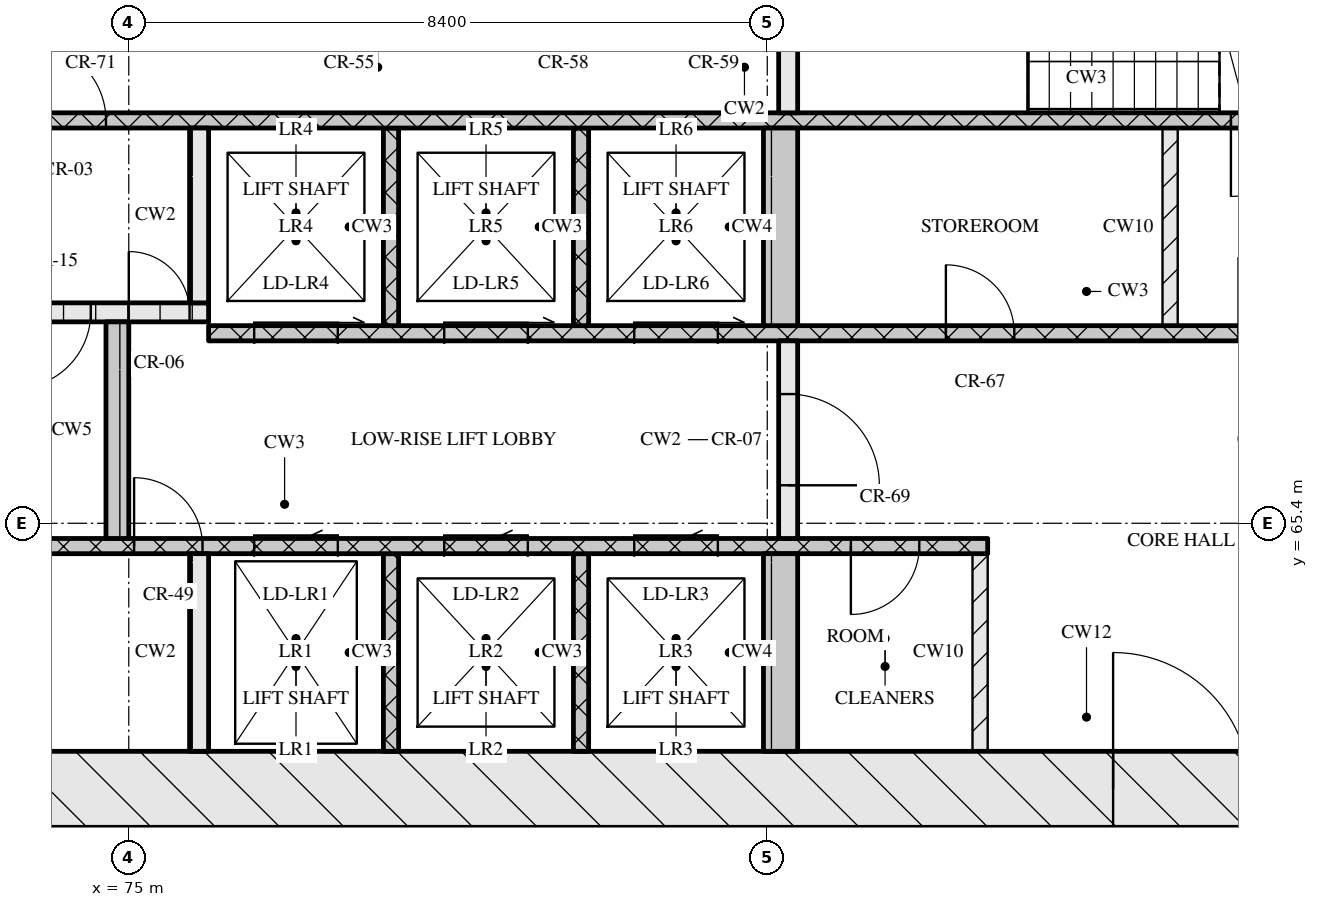
"""IFC4 building model, lengths in metres.
Left out: names, types, materials, properties, quantities, classifications, styles, units other than length and angle.
Written with IfcOpenShell. Run it as: python <this file> out.ifc"""

import sys

from ifc_helpers import new_model, si_unit, direction, frame, frame_2d, origin, place, context, subcontext, project, spatial, rectangle, extrude, element, fill, save


model = new_model("IFC4")
c1 = context("Model", 3, precision=1e-05, world=origin(), true_north=direction((0.0, 1.0)))
c2 = subcontext(c1, "Body", "Model", "MODEL_VIEW")
j1 = project(units=[si_unit("LENGTHUNIT", "METRE"), si_unit("PLANEANGLEUNIT", "RADIAN")], contexts=[c1])
p1 = place(None, origin())
s1 = spatial("IfcSite", under=j1, at=p1, CompositionType="ELEMENT")
p2 = place(p1, origin())
s2 = spatial("IfcBuilding", under=s1, at=p2, CompositionType="ELEMENT")
p3 = place(p2, frame((0.0, 0.0, 113.25)))
s3 = spatial("IfcBuildingStorey", under=s2, at=p3, CompositionType="ELEMENT", Elevation=113.25)
p4 = place(p3, frame((66.8, 61.9, 0.0), z_axis=(0.0, 0.0, 1.0), x_axis=(1.0, 0.0, 0.0)))
e1 = element("IfcWall", 1, at=p4, inside=s3, PredefinedType="SOLIDWALL", context=c2, shape_type="SweptSolid", body=[
    extrude(rectangle(XDim=41.6, YDim=1.0, at=frame_2d((20.8, 0.0))), origin(), (0.0, 0.0, 1.0), 3.32),
])
p5 = place(p4, frame((21.15, 0.0, 0.0)))
e2 = element("IfcOpeningElement", 2, at=p5, cuts=e1, PredefinedType="OPENING", context=c2, shape_type="SweptSolid", body=[
    extrude(rectangle(XDim=1.8, YDim=2.1, at=frame_2d((0.9, 1.05))), frame((0.0, 0.51, 0.0), z_axis=(0.0, -1.0, 0.0), x_axis=(1.0, 0.0, 0.0)), (0.0, 0.0, 1.0), 1.02),
])
p6 = place(p3, frame((75.925, 62.4, 0.0), z_axis=(0.0, 0.0, 1.0), x_axis=(0.0, 1.0, 0.0)))
e3 = element("IfcWall", 3, at=p6, inside=s3, PredefinedType="SOLIDWALL", context=c2, shape_type="SweptSolid", body=[
    extrude(rectangle(XDim=2.6, YDim=0.25, at=frame_2d((1.3, 0.0))), origin(), (0.0, 0.0, 1.0), 3.32),
])
for number, where, z_axis, x_axis in (
    (4, (78.45, 62.4, 0.0), (0.0, 0.0, 1.0), (0.0, 1.0, 0.0)),
    (5, (80.95, 62.4, 0.0), (0.0, 0.0, 1.0), (0.0, 1.0, 0.0)),
):
    element("IfcWall", number, at=place(p3, frame(where, z_axis=z_axis, x_axis=x_axis)), inside=s3, PredefinedType="SOLIDWALL", context=c2, shape_type="SweptSolid", body=[
        extrude(rectangle(XDim=2.6, YDim=0.2, at=frame_2d((1.3, 0.0))), origin(), (0.0, 0.0, 1.0), 3.32),
    ])
p7 = place(p3, frame((83.575, 62.4, 0.0), z_axis=(0.0, 0.0, 1.0), x_axis=(0.0, 1.0, 0.0)))
e6 = element("IfcWall", 6, at=p7, inside=s3, PredefinedType="SOLIDWALL", context=c2, shape_type="SweptSolid", body=[
    extrude(rectangle(XDim=2.6, YDim=0.45, at=frame_2d((1.3, 0.0))), origin(), (0.0, 0.0, 1.0), 3.32),
])
p8 = place(p3, frame((86.2, 62.4, 0.0), z_axis=(0.0, 0.0, 1.0), x_axis=(0.0, 1.0, 0.0)))
e7 = element("IfcWall", 7, at=p8, inside=s3, PredefinedType="PARTITIONING", context=c2, shape_type="SweptSolid", body=[
    extrude(rectangle(XDim=2.6, YDim=0.2, at=frame_2d((1.3, 0.0))), origin(), (0.0, 0.0, 1.0), 3.32),
])
p9 = place(p3, frame((67.8, 65.1, 0.0), z_axis=(0.0, 0.0, 1.0), x_axis=(1.0, 0.0, 0.0)))
e8 = element("IfcWall", 8, at=p9, inside=s3, PredefinedType="SOLIDWALL", context=c2, shape_type="SweptSolid", body=[
    extrude(rectangle(XDim=18.5, YDim=0.2, at=frame_2d((9.25, 0.0))), origin(), (0.0, 0.0, 1.0), 3.32),
])
p10 = place(p9, frame((7.27, 0.0, 0.0)))
e9 = element("IfcOpeningElement", 9, at=p10, cuts=e8, PredefinedType="OPENING", context=c2, shape_type="SweptSolid", body=[
    extrude(rectangle(XDim=0.9, YDim=2.1, at=frame_2d((0.45, 1.05))), frame((0.0, 0.11, 0.0), z_axis=(0.0, -1.0, 0.0), x_axis=(1.0, 0.0, 0.0)), (0.0, 0.0, 1.0), 0.22),
])
p11 = place(p9, frame((8.85, 0.0, 0.0)))
e10 = element("IfcOpeningElement", 10, at=p11, cuts=e8, PredefinedType="OPENING", context=c2, shape_type="SweptSolid", body=[
    extrude(rectangle(XDim=1.1, YDim=2.1, at=frame_2d((0.55, 1.05))), frame((0.0, 0.11, 0.0), z_axis=(0.0, -1.0, 0.0), x_axis=(1.0, 0.0, 0.0)), (0.0, 0.0, 1.0), 0.22),
])
p12 = place(p9, frame((11.35, 0.0, 0.0)))
e11 = element("IfcOpeningElement", 11, at=p12, cuts=e8, PredefinedType="OPENING", context=c2, shape_type="SweptSolid", body=[
    extrude(rectangle(XDim=1.1, YDim=2.1, at=frame_2d((0.55, 1.05))), frame((0.0, 0.11, 0.0), z_axis=(0.0, -1.0, 0.0), x_axis=(1.0, 0.0, 0.0)), (0.0, 0.0, 1.0), 0.22),
])
p13 = place(p9, frame((13.85, 0.0, 0.0)))
e12 = element("IfcOpeningElement", 12, at=p13, cuts=e8, PredefinedType="OPENING", context=c2, shape_type="SweptSolid", body=[
    extrude(rectangle(XDim=1.1, YDim=2.1, at=frame_2d((0.55, 1.05))), frame((0.0, 0.11, 0.0), z_axis=(0.0, -1.0, 0.0), x_axis=(1.0, 0.0, 0.0)), (0.0, 0.0, 1.0), 0.22),
])
p14 = place(p9, frame((16.7, 0.0, 0.0)))
e13 = element("IfcOpeningElement", 13, at=p14, cuts=e8, PredefinedType="OPENING", context=c2, shape_type="SweptSolid", body=[
    extrude(rectangle(XDim=0.9, YDim=2.1, at=frame_2d((0.45, 1.05))), frame((0.0, 0.11, 0.0), z_axis=(0.0, -1.0, 0.0), x_axis=(1.0, 0.0, 0.0)), (0.0, 0.0, 1.0), 0.22),
])
p15 = place(p3, frame((74.85, 65.2, 0.0), z_axis=(0.0, 0.0, 1.0), x_axis=(0.0, 1.0, 0.0)))
e14 = element("IfcWall", 14, at=p15, inside=s3, PredefinedType="SOLIDWALL", context=c2, shape_type="SweptSolid", body=[
    extrude(rectangle(XDim=2.85, YDim=0.3, at=frame_2d((1.425, 0.0))), origin(), (0.0, 0.0, 1.0), 3.32),
])
p16 = place(p3, frame((83.675, 65.2, 0.0), z_axis=(0.0, 0.0, 1.0), x_axis=(0.0, 1.0, 0.0)))
e15 = element("IfcWall", 15, at=p16, inside=s3, PredefinedType="SOLIDWALL", context=c2, shape_type="SweptSolid", body=[
    extrude(rectangle(XDim=2.6, YDim=0.25, at=frame_2d((1.3, 0.0))), origin(), (0.0, 0.0, 1.0), 3.32),
])
p17 = place(p16, frame((0.7, 0.0, 0.0)))
e16 = element("IfcOpeningElement", 16, at=p17, cuts=e15, PredefinedType="OPENING", context=c2, shape_type="SweptSolid", body=[
    extrude(rectangle(XDim=1.2, YDim=2.1, at=frame_2d((0.6, 1.05))), frame((0.0, 0.135, 0.0), z_axis=(0.0, -1.0, 0.0), x_axis=(1.0, 0.0, 0.0)), (0.0, 0.0, 1.0), 0.27),
])
p18 = place(p3, frame((76.05, 67.9, 0.0), z_axis=(0.0, 0.0, 1.0), x_axis=(1.0, 0.0, 0.0)))
e17 = element("IfcWall", 17, at=p18, inside=s3, PredefinedType="SOLIDWALL", context=c2, shape_type="SweptSolid", body=[
    extrude(rectangle(XDim=23.1, YDim=0.2, at=frame_2d((11.55, 0.0))), origin(), (0.0, 0.0, 1.0), 3.32),
])
p19 = place(p18, frame((0.6, 0.0, 0.0)))
e18 = element("IfcOpeningElement", 18, at=p19, cuts=e17, PredefinedType="OPENING", context=c2, shape_type="SweptSolid", body=[
    extrude(rectangle(XDim=1.1, YDim=2.1, at=frame_2d((0.55, 1.05))), frame((0.0, 0.11, 0.0), z_axis=(0.0, -1.0, 0.0), x_axis=(1.0, 0.0, 0.0)), (0.0, 0.0, 1.0), 0.22),
])
p20 = place(p18, frame((3.1, 0.0, 0.0)))
e19 = element("IfcOpeningElement", 19, at=p20, cuts=e17, PredefinedType="OPENING", context=c2, shape_type="SweptSolid", body=[
    extrude(rectangle(XDim=1.1, YDim=2.1, at=frame_2d((0.55, 1.05))), frame((0.0, 0.11, 0.0), z_axis=(0.0, -1.0, 0.0), x_axis=(1.0, 0.0, 0.0)), (0.0, 0.0, 1.0), 0.22),
])
p21 = place(p18, frame((5.6, 0.0, 0.0)))
e20 = element("IfcOpeningElement", 20, at=p21, cuts=e17, PredefinedType="OPENING", context=c2, shape_type="SweptSolid", body=[
    extrude(rectangle(XDim=1.1, YDim=2.1, at=frame_2d((0.55, 1.05))), frame((0.0, 0.11, 0.0), z_axis=(0.0, -1.0, 0.0), x_axis=(1.0, 0.0, 0.0)), (0.0, 0.0, 1.0), 0.22),
])
p22 = place(p18, frame((9.7, 0.0, 0.0)))
e21 = element("IfcOpeningElement", 21, at=p22, cuts=e17, PredefinedType="OPENING", context=c2, shape_type="SweptSolid", body=[
    extrude(rectangle(XDim=0.9, YDim=2.1, at=frame_2d((0.45, 1.05))), frame((0.0, 0.11, 0.0), z_axis=(0.0, -1.0, 0.0), x_axis=(1.0, 0.0, 0.0)), (0.0, 0.0, 1.0), 0.22),
])
p23 = place(p18, frame((13.55, 0.0, 0.0)))
e22 = element("IfcOpeningElement", 22, at=p23, cuts=e17, PredefinedType="OPENING", context=c2, shape_type="SweptSolid", body=[
    extrude(rectangle(XDim=1.0, YDim=2.1, at=frame_2d((0.5, 1.05))), frame((0.0, 0.11, 0.0), z_axis=(0.0, -1.0, 0.0), x_axis=(1.0, 0.0, 0.0)), (0.0, 0.0, 1.0), 0.22),
])
for number, where, z_axis, x_axis in (
    (23, (78.45, 68.0, 0.0), (0.0, 0.0, 1.0), (0.0, 1.0, 0.0)),
    (24, (80.95, 68.0, 0.0), (0.0, 0.0, 1.0), (0.0, 1.0, 0.0)),
):
    element("IfcWall", number, at=place(p3, frame(where, z_axis=z_axis, x_axis=x_axis)), inside=s3, PredefinedType="SOLIDWALL", context=c2, shape_type="SweptSolid", body=[
        extrude(rectangle(XDim=2.6, YDim=0.2, at=frame_2d((1.3, 0.0))), origin(), (0.0, 0.0, 1.0), 3.32),
    ])
p24 = place(p3, frame((83.575, 68.0, 0.0), z_axis=(0.0, 0.0, 1.0), x_axis=(0.0, 1.0, 0.0)))
e25 = element("IfcWall", 25, at=p24, inside=s3, PredefinedType="SOLIDWALL", context=c2, shape_type="SweptSolid", body=[
    extrude(rectangle(XDim=2.6, YDim=0.45, at=frame_2d((1.3, 0.0))), origin(), (0.0, 0.0, 1.0), 3.32),
])
p25 = place(p3, frame((88.7, 68.0, 0.0), z_axis=(0.0, 0.0, 1.0), x_axis=(0.0, 1.0, 0.0)))
e26 = element("IfcWall", 26, at=p25, inside=s3, PredefinedType="PARTITIONING", context=c2, shape_type="SweptSolid", body=[
    extrude(rectangle(XDim=2.6, YDim=0.2, at=frame_2d((1.3, 0.0))), origin(), (0.0, 0.0, 1.0), 3.32),
])
p26 = place(p3, frame((67.8, 68.175, 0.0), z_axis=(0.0, 0.0, 1.0), x_axis=(1.0, 0.0, 0.0)))
e27 = element("IfcWall", 27, at=p26, inside=s3, PredefinedType="SOLIDWALL", context=c2, shape_type="SweptSolid", body=[
    extrude(rectangle(XDim=8.25, YDim=0.25, at=frame_2d((4.125, 0.0))), origin(), (0.0, 0.0, 1.0), 3.32),
])
p27 = place(p26, frame((5.7, 0.0, 0.0)))
e28 = element("IfcOpeningElement", 28, at=p27, cuts=e27, PredefinedType="OPENING", context=c2, shape_type="SweptSolid", body=[
    extrude(rectangle(XDim=1.0, YDim=2.1, at=frame_2d((0.5, 1.05))), frame((0.0, 0.135, 0.0), z_axis=(0.0, -1.0, 0.0), x_axis=(1.0, 0.0, 0.0)), (0.0, 0.0, 1.0), 0.27),
])
p28 = place(p26, frame((7.2, 0.0, 0.0)))
e29 = element("IfcOpeningElement", 29, at=p28, cuts=e27, PredefinedType="OPENING", context=c2, shape_type="SweptSolid", body=[
    extrude(rectangle(XDim=0.8, YDim=2.1, at=frame_2d((0.4, 1.05))), frame((0.0, 0.135, 0.0), z_axis=(0.0, -1.0, 0.0), x_axis=(1.0, 0.0, 0.0)), (0.0, 0.0, 1.0), 0.27),
])
p29 = place(p3, frame((75.925, 68.3, 0.0), z_axis=(0.0, 0.0, 1.0), x_axis=(0.0, 1.0, 0.0)))
e30 = element("IfcWall", 30, at=p29, inside=s3, PredefinedType="SOLIDWALL", context=c2, shape_type="SweptSolid", body=[
    extrude(rectangle(XDim=2.3, YDim=0.25, at=frame_2d((1.15, 0.0))), origin(), (0.0, 0.0, 1.0), 3.32),
])
p30 = place(p3, frame((67.8, 70.7, 0.0), z_axis=(0.0, 0.0, 1.0), x_axis=(1.0, 0.0, 0.0)))
e31 = element("IfcWall", 31, at=p30, inside=s3, PredefinedType="SOLIDWALL", context=c2, shape_type="SweptSolid", body=[
    extrude(rectangle(XDim=39.6, YDim=0.2, at=frame_2d((19.8, 0.0))), origin(), (0.0, 0.0, 1.0), 3.32),
])
p31 = place(p30, frame((0.65, 0.0, 0.0)))
e32 = element("IfcOpeningElement", 32, at=p31, cuts=e31, PredefinedType="OPENING", context=c2, shape_type="SweptSolid", body=[
    extrude(rectangle(XDim=1.1, YDim=2.1, at=frame_2d((0.55, 1.05))), frame((0.0, 0.11, 0.0), z_axis=(0.0, -1.0, 0.0), x_axis=(1.0, 0.0, 0.0)), (0.0, 0.0, 1.0), 0.22),
])
p32 = place(p30, frame((3.25, 0.0, 0.0)))
e33 = element("IfcOpeningElement", 33, at=p32, cuts=e31, PredefinedType="OPENING", context=c2, shape_type="SweptSolid", body=[
    extrude(rectangle(XDim=1.1, YDim=2.1, at=frame_2d((0.55, 1.05))), frame((0.0, 0.11, 0.0), z_axis=(0.0, -1.0, 0.0), x_axis=(1.0, 0.0, 0.0)), (0.0, 0.0, 1.0), 0.22),
])
p33 = place(p30, frame((5.9, 0.0, 0.0)))
e34 = element("IfcOpeningElement", 34, at=p33, cuts=e31, PredefinedType="OPENING", context=c2, shape_type="SweptSolid", body=[
    extrude(rectangle(XDim=1.0, YDim=2.1, at=frame_2d((0.5, 1.05))), frame((0.0, 0.11, 0.0), z_axis=(0.0, -1.0, 0.0), x_axis=(1.0, 0.0, 0.0)), (0.0, 0.0, 1.0), 0.22),
])
p34 = place(p30, frame((21.7, 0.0, 0.0)))
e35 = element("IfcOpeningElement", 35, at=p34, cuts=e31, PredefinedType="OPENING", context=c2, shape_type="SweptSolid", body=[
    extrude(rectangle(XDim=1.0, YDim=2.1, at=frame_2d((0.5, 1.05))), frame((0.0, 0.11, 0.0), z_axis=(0.0, -1.0, 0.0), x_axis=(1.0, 0.0, 0.0)), (0.0, 0.0, 1.0), 0.22),
])
p35 = place(p30, frame((32.7, 0.0, 0.0)))
e36 = element("IfcOpeningElement", 36, at=p35, cuts=e31, PredefinedType="OPENING", context=c2, shape_type="SweptSolid", body=[
    extrude(rectangle(XDim=1.0, YDim=2.1, at=frame_2d((0.5, 1.05))), frame((0.0, 0.11, 0.0), z_axis=(0.0, -1.0, 0.0), x_axis=(1.0, 0.0, 0.0)), (0.0, 0.0, 1.0), 0.22),
])
p36 = place(p30, frame((35.25, 0.0, 0.0)))
e37 = element("IfcOpeningElement", 37, at=p36, cuts=e31, PredefinedType="OPENING", context=c2, shape_type="SweptSolid", body=[
    extrude(rectangle(XDim=1.1, YDim=2.1, at=frame_2d((0.55, 1.05))), frame((0.0, 0.11, 0.0), z_axis=(0.0, -1.0, 0.0), x_axis=(1.0, 0.0, 0.0)), (0.0, 0.0, 1.0), 0.22),
])
p37 = place(p30, frame((37.85, 0.0, 0.0)))
e38 = element("IfcOpeningElement", 38, at=p37, cuts=e31, PredefinedType="OPENING", context=c2, shape_type="SweptSolid", body=[
    extrude(rectangle(XDim=1.1, YDim=2.1, at=frame_2d((0.55, 1.05))), frame((0.0, 0.11, 0.0), z_axis=(0.0, -1.0, 0.0), x_axis=(1.0, 0.0, 0.0)), (0.0, 0.0, 1.0), 0.22),
])
p38 = place(p3, frame((83.675, 70.8, 0.0), z_axis=(0.0, 0.0, 1.0), x_axis=(0.0, 1.0, 0.0)))
e39 = element("IfcWall", 39, at=p38, inside=s3, PredefinedType="SOLIDWALL", context=c2, shape_type="SweptSolid", body=[
    extrude(rectangle(XDim=1.2, YDim=0.25, at=frame_2d((0.6, 0.0))), origin(), (0.0, 0.0, 1.0), 3.32),
])
p39 = place(p5, origin())
e40 = element("IfcDoor", 40, at=p39, inside=s3, OperationType="DOUBLE_DOOR_SINGLE_SWING", PredefinedType="DOOR", context=c2, shape_type="SweptSolid", body=[
    extrude(rectangle(XDim=1.8, YDim=2.1, at=frame_2d((0.9, 1.05))), frame((0.0, 0.025, 0.0), z_axis=(0.0, -1.0, 0.0), x_axis=(1.0, 0.0, 0.0)), (0.0, 0.0, 1.0), 0.05),
])
fill(e2, e40)
p40 = place(p10, origin())
e41 = element("IfcDoor", 41, at=p40, inside=s3, OperationType="SINGLE_SWING_LEFT", PredefinedType="DOOR", context=c2, shape_type="SweptSolid", body=[
    extrude(rectangle(XDim=0.9, YDim=2.1, at=frame_2d((0.45, 1.05))), frame((0.0, 0.025, 0.0), z_axis=(0.0, -1.0, 0.0), x_axis=(1.0, 0.0, 0.0)), (0.0, 0.0, 1.0), 0.05),
])
fill(e9, e41)
p41 = place(p11, origin())
e42 = element("IfcDoor", 42, at=p41, inside=s3, OperationType="SLIDING_TO_LEFT", PredefinedType="DOOR", context=c2, shape_type="SweptSolid", body=[
    extrude(rectangle(XDim=1.1, YDim=2.1, at=frame_2d((0.55, 1.05))), frame((0.0, 0.025, 0.0), z_axis=(0.0, -1.0, 0.0), x_axis=(1.0, 0.0, 0.0)), (0.0, 0.0, 1.0), 0.05),
])
fill(e10, e42)
p42 = place(p12, origin())
e43 = element("IfcDoor", 43, at=p42, inside=s3, OperationType="SLIDING_TO_LEFT", PredefinedType="DOOR", context=c2, shape_type="SweptSolid", body=[
    extrude(rectangle(XDim=1.1, YDim=2.1, at=frame_2d((0.55, 1.05))), frame((0.0, 0.025, 0.0), z_axis=(0.0, -1.0, 0.0), x_axis=(1.0, 0.0, 0.0)), (0.0, 0.0, 1.0), 0.05),
])
fill(e11, e43)
p43 = place(p13, origin())
e44 = element("IfcDoor", 44, at=p43, inside=s3, OperationType="SLIDING_TO_LEFT", PredefinedType="DOOR", context=c2, shape_type="SweptSolid", body=[
    extrude(rectangle(XDim=1.1, YDim=2.1, at=frame_2d((0.55, 1.05))), frame((0.0, 0.025, 0.0), z_axis=(0.0, -1.0, 0.0), x_axis=(1.0, 0.0, 0.0)), (0.0, 0.0, 1.0), 0.05),
])
fill(e12, e44)
p44 = place(p14, origin())
e45 = element("IfcDoor", 45, at=p44, inside=s3, OperationType="SINGLE_SWING_RIGHT", PredefinedType="DOOR", context=c2, shape_type="SweptSolid", body=[
    extrude(rectangle(XDim=0.9, YDim=2.1, at=frame_2d((0.45, 1.05))), frame((0.0, 0.025, 0.0), z_axis=(0.0, -1.0, 0.0), x_axis=(1.0, 0.0, 0.0)), (0.0, 0.0, 1.0), 0.05),
])
fill(e13, e45)
p45 = place(p17, origin())
e46 = element("IfcDoor", 46, at=p45, inside=s3, OperationType="SINGLE_SWING_RIGHT", PredefinedType="DOOR", context=c2, shape_type="SweptSolid", body=[
    extrude(rectangle(XDim=1.2, YDim=2.1, at=frame_2d((0.6, 1.05))), frame((0.0, 0.025, 0.0), z_axis=(0.0, -1.0, 0.0), x_axis=(1.0, 0.0, 0.0)), (0.0, 0.0, 1.0), 0.05),
])
fill(e16, e46)
p46 = place(p19, origin())
e47 = element("IfcDoor", 47, at=p46, inside=s3, OperationType="SLIDING_TO_RIGHT", PredefinedType="DOOR", context=c2, shape_type="SweptSolid", body=[
    extrude(rectangle(XDim=1.1, YDim=2.1, at=frame_2d((0.55, 1.05))), frame((0.0, 0.025, 0.0), z_axis=(0.0, -1.0, 0.0), x_axis=(1.0, 0.0, 0.0)), (0.0, 0.0, 1.0), 0.05),
])
fill(e18, e47)
p47 = place(p20, origin())
e48 = element("IfcDoor", 48, at=p47, inside=s3, OperationType="SLIDING_TO_RIGHT", PredefinedType="DOOR", context=c2, shape_type="SweptSolid", body=[
    extrude(rectangle(XDim=1.1, YDim=2.1, at=frame_2d((0.55, 1.05))), frame((0.0, 0.025, 0.0), z_axis=(0.0, -1.0, 0.0), x_axis=(1.0, 0.0, 0.0)), (0.0, 0.0, 1.0), 0.05),
])
fill(e19, e48)
p48 = place(p21, origin())
e49 = element("IfcDoor", 49, at=p48, inside=s3, OperationType="SLIDING_TO_RIGHT", PredefinedType="DOOR", context=c2, shape_type="SweptSolid", body=[
    extrude(rectangle(XDim=1.1, YDim=2.1, at=frame_2d((0.55, 1.05))), frame((0.0, 0.025, 0.0), z_axis=(0.0, -1.0, 0.0), x_axis=(1.0, 0.0, 0.0)), (0.0, 0.0, 1.0), 0.05),
])
fill(e20, e49)
p49 = place(p22, origin())
e50 = element("IfcDoor", 50, at=p49, inside=s3, OperationType="SINGLE_SWING_LEFT", PredefinedType="DOOR", context=c2, shape_type="SweptSolid", body=[
    extrude(rectangle(XDim=0.9, YDim=2.1, at=frame_2d((0.45, 1.05))), frame((0.0, 0.025, 0.0), z_axis=(0.0, -1.0, 0.0), x_axis=(1.0, 0.0, 0.0)), (0.0, 0.0, 1.0), 0.05),
])
fill(e21, e50)
p50 = place(p27, origin())
e51 = element("IfcDoor", 51, at=p50, inside=s3, OperationType="SINGLE_SWING_RIGHT", PredefinedType="DOOR", context=c2, shape_type="SweptSolid", body=[
    extrude(rectangle(XDim=1.0, YDim=2.1, at=frame_2d((0.5, 1.05))), frame((0.0, 0.025, 0.0), z_axis=(0.0, -1.0, 0.0), x_axis=(1.0, 0.0, 0.0)), (0.0, 0.0, 1.0), 0.05),
])
fill(e28, e51)
p51 = place(p28, origin())
e52 = element("IfcDoor", 52, at=p51, inside=s3, OperationType="SINGLE_SWING_LEFT", PredefinedType="DOOR", context=c2, shape_type="SweptSolid", body=[
    extrude(rectangle(XDim=0.8, YDim=2.1, at=frame_2d((0.4, 1.05))), frame((0.0, 0.025, 0.0), z_axis=(0.0, -1.0, 0.0), x_axis=(1.0, 0.0, 0.0)), (0.0, 0.0, 1.0), 0.05),
])
fill(e29, e52)
p52 = place(p33, origin())
e53 = element("IfcDoor", 53, at=p52, inside=s3, OperationType="SINGLE_SWING_LEFT", PredefinedType="DOOR", context=c2, shape_type="SweptSolid", body=[
    extrude(rectangle(XDim=1.0, YDim=2.1, at=frame_2d((0.5, 1.05))), frame((0.0, 0.025, 0.0), z_axis=(0.0, -1.0, 0.0), x_axis=(1.0, 0.0, 0.0)), (0.0, 0.0, 1.0), 0.05),
])
fill(e34, e53)
p53 = place(p34, origin())
e54 = element("IfcDoor", 54, at=p53, inside=s3, OperationType="SINGLE_SWING_RIGHT", PredefinedType="DOOR", context=c2, shape_type="SweptSolid", body=[
    extrude(rectangle(XDim=1.0, YDim=2.1, at=frame_2d((0.5, 1.05))), frame((0.0, 0.025, 0.0), z_axis=(0.0, -1.0, 0.0), x_axis=(1.0, 0.0, 0.0)), (0.0, 0.0, 1.0), 0.05),
])
fill(e35, e54)
save(model, sys.argv[1])
